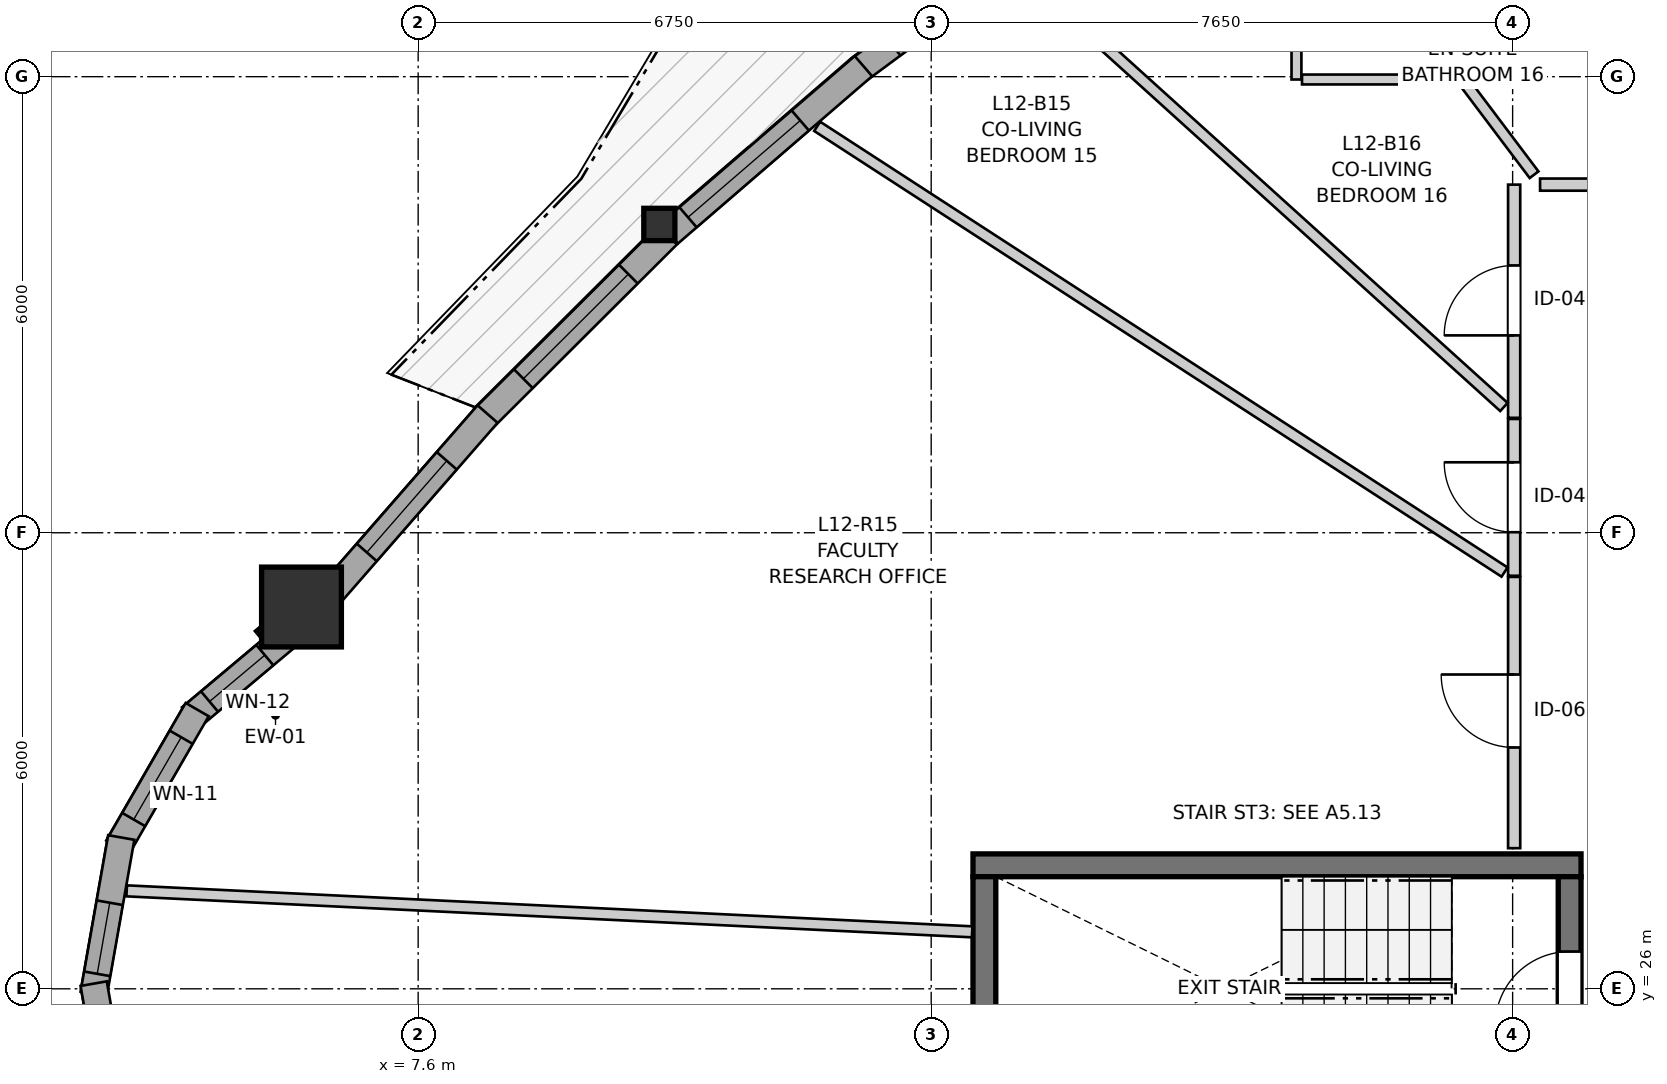
"""IFC4 building model, lengths in metres.
Left out: names, types, materials, properties, quantities, classifications, styles, units other than length and angle.
Written with IfcOpenShell. Run it as: python <this file> out.ifc"""

import sys

from ifc_helpers import new_model, si_unit, direction, frame, frame_2d, origin, origin_2d, place, context, subcontext, project, spatial, rectangle, i_section, extrude, source, transform, mapped, element, fill, save


model = new_model("IFC4")
c1 = context("Model", 3, precision=1e-05, world=origin(), true_north=direction((0.0, 1.0)))
c2 = subcontext(c1, "Body", "Model", "MODEL_VIEW")
j1 = project(units=[si_unit("LENGTHUNIT", "METRE"), si_unit("PLANEANGLEUNIT", "RADIAN")], contexts=[c1])
p1 = place(None, origin())
s1 = spatial("IfcSite", under=j1, at=p1, CompositionType="ELEMENT")
p2 = place(p1, origin())
s2 = spatial("IfcBuilding", under=s1, at=p2, CompositionType="ELEMENT")
p3 = place(p2, frame((0.0, 0.0, 43.0)))
s3 = spatial("IfcBuildingStorey", under=s2, at=p3, CompositionType="ELEMENT", Elevation=43.0)
p4 = place(p3, frame((22.9, 27.625, 0.0), z_axis=(0.0, 0.0, 1.0), x_axis=(-1.0, 0.0, 0.0)))
e1 = element("IfcWall", 1, at=p4, inside=s3, PredefinedType="SHEAR", context=c2, shape_type="SweptSolid", body=[
    extrude(rectangle(XDim=8.0, YDim=0.3, at=frame_2d((4.0, 0.0))), origin(), (0.0, 0.0, 1.0), 2.94),
])
p5 = place(p3, frame((15.05, 27.475, 0.0), z_axis=(0.0, 0.0, 1.0), x_axis=(0.0, -1.0, 0.0)))
e2 = element("IfcWall", 2, at=p5, inside=s3, PredefinedType="SHEAR", context=c2, shape_type="SweptSolid", body=[
    extrude(rectangle(XDim=2.95, YDim=0.3, at=frame_2d((1.475, 0.0))), origin(), (0.0, 0.0, 1.0), 2.94),
])
p6 = place(p3, frame((22.75, 24.525, 0.0), z_axis=(0.0, 0.0, 1.0), x_axis=(0.0, 1.0, 0.0)))
e3 = element("IfcWall", 3, at=p6, inside=s3, PredefinedType="SHEAR", context=c2, shape_type="SweptSolid", body=[
    extrude(rectangle(XDim=2.95, YDim=0.3, at=frame_2d((1.475, 0.0))), origin(), (0.0, 0.0, 1.0), 2.94),
])
p7 = place(p6, frame((0.985, 0.0, 0.0)))
e4 = element("IfcOpeningElement", 4, at=p7, cuts=e3, PredefinedType="OPENING", context=c2, shape_type="SweptSolid", body=[
    extrude(rectangle(XDim=0.98, YDim=2.15, at=frame_2d((0.49, 1.075))), frame((0.0, 0.16, 0.0), z_axis=(0.0, -1.0, 0.0), x_axis=(1.0, 0.0, 0.0)), (0.0, 0.0, 1.0), 0.32),
])
m1 = source(origin(), c2, "Body", "SweptSolid", [
    extrude(rectangle(XDim=1.05, YDim=1.05, at=origin_2d()), origin(), (0.0, 0.0, 1.0), 2.94),
])
p8 = place(p3, frame((6.065, 31.023, 0.0), z_axis=(0.0, 0.0, 1.0), x_axis=(1.0, 0.0, 0.0)))
e5 = element("IfcColumn", 5, at=p8, inside=s3, PredefinedType="COLUMN", context=c2, shape_type="MappedRepresentation", body=[
    mapped(m1, transform((0.0, 0.0, 0.0), x_axis=(1.0, 0.0, 0.0), y_axis=(0.0, 1.0, 0.0), z_axis=(0.0, 0.0, 1.0), scale=1.0)),
])
m2 = source(origin(), c2, "Body", "SweptSolid", [
    extrude(i_section(OverallWidth=0.409, OverallDepth=0.425, WebThickness=0.03, FlangeThickness=0.048, FilletRadius=0.015, at=origin_2d()), origin(), (0.0, 0.0, 1.0), 2.94),
])
p9 = place(p3, frame((10.773, 36.056, 0.0), z_axis=(0.0, 0.0, 1.0), x_axis=(1.0, 0.0, 0.0)))
e6 = element("IfcColumn", 6, at=p9, inside=s3, PredefinedType="PILASTER", context=c2, shape_type="MappedRepresentation", body=[
    mapped(m2, transform((0.0, 0.0, 0.0), x_axis=(1.0, 0.0, 0.0), y_axis=(0.0, 1.0, 0.0), z_axis=(0.0, 0.0, 1.0), scale=1.0)),
])
p10 = place(p3, frame((5.948, 30.696, 0.0), z_axis=(0.0, 0.0, 1.0), x_axis=(-0.766058770736, -0.642770534311, 0.0)))
e7 = element("IfcWall", 7, at=p10, inside=s3, PredefinedType="SOLIDWALL", context=c2, shape_type="SweptSolid", body=[
    extrude(rectangle(XDim=1.752, YDim=0.35, at=frame_2d((0.876, 0.0))), origin(), (0.0, 0.0, 1.0), 2.42),
])
p11 = place(p10, frame((0.476, 0.0, 0.82)))
e8 = element("IfcOpeningElement", 8, at=p11, cuts=e7, PredefinedType="OPENING", context=c2, shape_type="SweptSolid", body=[
    extrude(rectangle(XDim=0.95, YDim=1.35, at=frame_2d((0.475, 0.675))), frame((0.0, 0.185, 0.0), z_axis=(0.0, -1.0, 0.0), x_axis=(1.0, 0.0, 0.0)), (0.0, 0.0, 1.0), 0.37),
])
p12 = place(p3, frame((4.692, 29.674, 0.0), z_axis=(0.0, 0.0, 1.0), x_axis=(-0.49990781971, -0.866078617559, 0.0)))
e9 = element("IfcWall", 9, at=p12, inside=s3, PredefinedType="SOLIDWALL", context=c2, shape_type="SweptSolid", body=[
    extrude(rectangle(XDim=2.09, YDim=0.35, at=frame_2d((1.045, 0.0))), origin(), (0.0, 0.0, 1.0), 2.42),
])
p13 = place(p12, frame((0.42, 0.0, 0.82)))
e10 = element("IfcOpeningElement", 10, at=p13, cuts=e9, PredefinedType="OPENING", context=c2, shape_type="SweptSolid", body=[
    extrude(rectangle(XDim=1.25, YDim=1.35, at=frame_2d((0.625, 0.675))), frame((0.0, 0.185, 0.0), z_axis=(0.0, -1.0, 0.0), x_axis=(1.0, 0.0, 0.0)), (0.0, 0.0, 1.0), 0.37),
])
p14 = place(p3, frame((3.694, 27.991, 0.0), z_axis=(0.0, 0.0, 1.0), x_axis=(-0.173558792186, -0.984823509902, 0.0)))
e11 = element("IfcWall", 11, at=p14, inside=s3, PredefinedType="SOLIDWALL", context=c2, shape_type="SweptSolid", body=[
    extrude(rectangle(XDim=2.09, YDim=0.35, at=frame_2d((1.045, 0.0))), origin(), (0.0, 0.0, 1.0), 2.42),
])
p15 = place(p14, frame((0.871, 0.0, 0.82)))
e12 = element("IfcOpeningElement", 12, at=p15, cuts=e11, PredefinedType="OPENING", context=c2, shape_type="SweptSolid", body=[
    extrude(rectangle(XDim=0.95, YDim=1.35, at=frame_2d((0.475, 0.675))), frame((0.0, 0.185, 0.0), z_axis=(0.0, -1.0, 0.0), x_axis=(1.0, 0.0, 0.0)), (0.0, 0.0, 1.0), 0.37),
])
p16 = place(p3, frame((3.331, 26.068, 0.0), z_axis=(0.0, 0.0, 1.0), x_axis=(0.173558792186, -0.984823509902, 0.0)))
e13 = element("IfcWall", 13, at=p16, inside=s3, PredefinedType="SOLIDWALL", context=c2, shape_type="SweptSolid", body=[
    extrude(rectangle(XDim=2.09, YDim=0.35, at=frame_2d((1.045, 0.0))), origin(), (0.0, 0.0, 1.0), 2.42),
])
p17 = place(p16, frame((0.32, 0.0, 0.82)))
e14 = element("IfcOpeningElement", 14, at=p17, cuts=e13, PredefinedType="OPENING", context=c2, shape_type="SweptSolid", body=[
    extrude(rectangle(XDim=1.45, YDim=1.25, at=frame_2d((0.725, 0.625))), frame((0.0, 0.185, 0.0), z_axis=(0.0, -1.0, 0.0), x_axis=(1.0, 0.0, 0.0)), (0.0, 0.0, 1.0), 0.37),
])
p18 = place(p3, frame((15.846, 39.902, 0.0), z_axis=(0.0, 0.0, 1.0), x_axis=(-0.803789189233, -0.594914228501, 0.0)))
e15 = element("IfcWall", 15, at=p18, inside=s3, PredefinedType="SOLIDWALL", context=c2, shape_type="SweptSolid", body=[
    extrude(rectangle(XDim=3.056, YDim=0.35, at=frame_2d((1.528, 0.0))), origin(), (0.0, 0.0, 1.0), 2.42),
])
p19 = place(p18, frame((1.044, 0.0, 0.82)))
e16 = element("IfcOpeningElement", 16, at=p19, cuts=e15, PredefinedType="OPENING", context=c2, shape_type="SweptSolid", body=[
    extrude(rectangle(XDim=1.45, YDim=1.25, at=frame_2d((0.725, 0.625))), frame((0.0, 0.185, 0.0), z_axis=(0.0, -1.0, 0.0), x_axis=(1.0, 0.0, 0.0)), (0.0, 0.0, 1.0), 0.37),
])
p20 = place(p3, frame((13.458, 38.139, 0.0), z_axis=(0.0, 0.0, 1.0), x_axis=(-0.757450680395, -0.652892385289, 0.0)))
e17 = element("IfcWall", 17, at=p20, inside=s3, PredefinedType="SOLIDWALL", context=c2, shape_type="SweptSolid", body=[
    extrude(rectangle(XDim=3.374, YDim=0.35, at=frame_2d((1.687, 0.0))), origin(), (0.0, 0.0, 1.0), 2.42),
])
p21 = place(p20, frame((1.097, 0.0, 0.82)))
e18 = element("IfcOpeningElement", 18, at=p21, cuts=e17, PredefinedType="OPENING", context=c2, shape_type="SweptSolid", body=[
    extrude(rectangle(XDim=1.95, YDim=1.4, at=frame_2d((0.975, 0.7))), frame((0.0, 0.185, 0.0), z_axis=(0.0, -1.0, 0.0), x_axis=(1.0, 0.0, 0.0)), (0.0, 0.0, 1.0), 0.37),
])
p22 = place(p3, frame((10.883, 35.918, 0.0), z_axis=(0.0, 0.0, 1.0), x_axis=(-0.708386995502, -0.70582424484, 0.0)))
e19 = element("IfcWall", 19, at=p22, inside=s3, PredefinedType="SOLIDWALL", context=c2, shape_type="SweptSolid", body=[
    extrude(rectangle(XDim=3.429, YDim=0.35, at=frame_2d((1.715, 0.0))), origin(), (0.0, 0.0, 1.0), 2.42),
])
p23 = place(p22, frame((0.73, 0.0, 0.82)))
e20 = element("IfcOpeningElement", 20, at=p23, cuts=e19, PredefinedType="OPENING", context=c2, shape_type="SweptSolid", body=[
    extrude(rectangle(XDim=1.95, YDim=1.4, at=frame_2d((0.975, 0.7))), frame((0.0, 0.185, 0.0), z_axis=(0.0, -1.0, 0.0), x_axis=(1.0, 0.0, 0.0)), (0.0, 0.0, 1.0), 0.37),
])
p24 = place(p3, frame((8.513, 33.561, 0.0), z_axis=(0.0, 0.0, 1.0), x_axis=(-0.657640586907, -0.753331838205, 0.0)))
e21 = element("IfcWall", 21, at=p24, inside=s3, PredefinedType="SOLIDWALL", context=c2, shape_type="SweptSolid", body=[
    extrude(rectangle(XDim=3.222, YDim=0.35, at=frame_2d((1.611, 0.0))), origin(), (0.0, 0.0, 1.0), 2.42),
])
p25 = place(p24, frame((0.816, 0.0, 0.82)))
e22 = element("IfcOpeningElement", 22, at=p25, cuts=e21, PredefinedType="OPENING", context=c2, shape_type="SweptSolid", body=[
    extrude(rectangle(XDim=1.6, YDim=1.35, at=frame_2d((0.8, 0.675))), frame((0.0, 0.185, 0.0), z_axis=(0.0, -1.0, 0.0), x_axis=(1.0, 0.0, 0.0)), (0.0, 0.0, 1.0), 0.37),
])
p26 = place(p3, frame((22.02, 27.85, 0.0), z_axis=(0.0, 0.0, 1.0), x_axis=(0.0, 1.0, 0.0)))
e23 = element("IfcWall", 23, at=p26, inside=s3, PredefinedType="PARTITIONING", context=c2, shape_type="SweptSolid", body=[
    extrude(rectangle(XDim=3.569, YDim=0.16, at=frame_2d((1.784, 0.0))), origin(), (0.0, 0.0, 1.0), 2.94),
])
p27 = place(p26, frame((1.325, 0.0, 0.0)))
e24 = element("IfcOpeningElement", 24, at=p27, cuts=e23, PredefinedType="OPENING", context=c2, shape_type="SweptSolid", body=[
    extrude(rectangle(XDim=0.96, YDim=2.1, at=frame_2d((0.48, 1.05))), frame((0.0, 0.09, 0.0), z_axis=(0.0, -1.0, 0.0), x_axis=(1.0, 0.0, 0.0)), (0.0, 0.0, 1.0), 0.18),
])
p28 = place(p3, frame((22.361, 36.58, 0.0), z_axis=(0.0, 0.0, 1.0), x_axis=(1.0, 0.0, 0.0)))
e25 = element("IfcWall", 25, at=p28, inside=s3, PredefinedType="PARTITIONING", context=c2, shape_type="SweptSolid", body=[
    extrude(rectangle(XDim=3.498, YDim=0.16, at=frame_2d((1.749, 0.0))), origin(), (0.0, 0.0, 1.0), 2.548),
])
p29 = place(p28, frame((1.291, 0.0, 0.0)))
e26 = element("IfcOpeningElement", 26, at=p29, cuts=e25, PredefinedType="OPENING", context=c2, shape_type="SweptSolid", body=[
    extrude(rectangle(XDim=0.92, YDim=2.1, at=frame_2d((0.46, 1.05))), frame((0.0, 0.09, 0.0), z_axis=(0.0, -1.0, 0.0), x_axis=(1.0, 0.0, 0.0)), (0.0, 0.0, 1.0), 0.18),
])
p30 = place(p3, frame((22.02, 33.512, 0.0), z_axis=(0.0, 0.0, 1.0), x_axis=(0.0, 1.0, 0.0)))
e27 = element("IfcWall", 27, at=p30, inside=s3, PredefinedType="PARTITIONING", context=c2, shape_type="SweptSolid", body=[
    extrude(rectangle(XDim=3.068, YDim=0.16, at=frame_2d((1.534, 0.0))), origin(), (0.0, 0.0, 1.0), 2.94),
])
p31 = place(p30, frame((1.084, 0.0, 0.0)))
e28 = element("IfcOpeningElement", 28, at=p31, cuts=e27, PredefinedType="OPENING", context=c2, shape_type="SweptSolid", body=[
    extrude(rectangle(XDim=0.92, YDim=2.1, at=frame_2d((0.46, 1.05))), frame((0.0, 0.09, 0.0), z_axis=(0.0, -1.0, 0.0), x_axis=(1.0, 0.0, 0.0)), (0.0, 0.0, 1.0), 0.18),
])
p32 = place(p3, frame((22.02, 31.434, 0.0), z_axis=(0.0, 0.0, 1.0), x_axis=(0.0, 1.0, 0.0)))
e29 = element("IfcWall", 29, at=p32, inside=s3, PredefinedType="PARTITIONING", context=c2, shape_type="SweptSolid", body=[
    extrude(rectangle(XDim=2.063, YDim=0.16, at=frame_2d((1.031, 0.0))), origin(), (0.0, 0.0, 1.0), 2.94),
])
p33 = place(p32, frame((0.573, 0.0, 0.0)))
e30 = element("IfcOpeningElement", 30, at=p33, cuts=e29, PredefinedType="OPENING", context=c2, shape_type="SweptSolid", body=[
    extrude(rectangle(XDim=0.92, YDim=2.1, at=frame_2d((0.46, 1.05))), frame((0.0, 0.09, 0.0), z_axis=(0.0, -1.0, 0.0), x_axis=(1.0, 0.0, 0.0)), (0.0, 0.0, 1.0), 0.18),
])
p34 = place(p3, frame((19.156, 39.863, 0.0), z_axis=(0.0, 0.0, 1.0), x_axis=(0.0, -1.0, 0.0)))
e31 = element("IfcWall", 31, at=p34, inside=s3, PredefinedType="PARTITIONING", context=c2, shape_type="SweptSolid", body=[
    extrude(rectangle(XDim=1.9, YDim=0.13, at=frame_2d((0.95, 0.0))), origin(), (0.0, 0.0, 1.0), 2.94),
])
p35 = place(p34, frame((0.51, 0.0, 0.0)))
e32 = element("IfcOpeningElement", 32, at=p35, cuts=e31, PredefinedType="OPENING", context=c2, shape_type="SweptSolid", body=[
    extrude(rectangle(XDim=0.88, YDim=2.05, at=frame_2d((0.44, 1.025))), frame((0.0, 0.075, 0.0), z_axis=(0.0, -1.0, 0.0), x_axis=(1.0, 0.0, 0.0)), (0.0, 0.0, 1.0), 0.15),
])
p36 = place(p3, frame((3.765, 27.289, 0.0), z_axis=(0.0, 0.0, 1.0), x_axis=(0.998826748689, -0.048426502082, 0.0)))
e33 = element("IfcWall", 33, at=p36, inside=s3, PredefinedType="PARTITIONING", context=c2, shape_type="SweptSolid", body=[
    extrude(rectangle(XDim=11.137, YDim=0.145, at=frame_2d((5.568, 0.0))), origin(), (0.0, 0.0, 1.0), 2.94),
])
p37 = place(p3, frame((12.85, 37.347, 0.0), z_axis=(0.0, 0.0, 1.0), x_axis=(0.839070272759, -0.544023048567, 0.0)))
e34 = element("IfcWall", 34, at=p37, inside=s3, PredefinedType="PARTITIONING", context=c2, shape_type="SweptSolid", body=[
    extrude(rectangle(XDim=10.779, YDim=0.145, at=frame_2d((5.389, 0.0))), origin(), (0.0, 0.0, 1.0), 2.94),
])
p38 = place(p3, frame((15.516, 39.413, 0.0), z_axis=(0.0, 0.0, 1.0), x_axis=(0.741796419009, -0.670625135784, 0.0)))
e35 = element("IfcWall", 35, at=p38, inside=s3, PredefinedType="PARTITIONING", context=c2, shape_type="SweptSolid", body=[
    extrude(rectangle(XDim=8.586, YDim=0.145, at=frame_2d((4.293, 0.0))), origin(), (0.0, 0.0, 1.0), 2.94),
])
p39 = place(p3, frame((20.941, 38.49, 0.0), z_axis=(0.0, 0.0, 1.0), x_axis=(0.601733790382, -0.798696716853, 0.0)))
e36 = element("IfcWall", 36, at=p39, inside=s3, PredefinedType="PARTITIONING", context=c2, shape_type="SweptSolid", body=[
    extrude(rectangle(XDim=2.229, YDim=0.145, at=frame_2d((1.114, 0.0))), origin(), (0.0, 0.0, 1.0), 2.94),
])
p40 = place(p3, frame((19.229, 37.963, 0.0), z_axis=(0.0, 0.0, 1.0), x_axis=(1.0, 0.0, 0.0)))
e37 = element("IfcWall", 37, at=p40, inside=s3, PredefinedType="PARTITIONING", context=c2, shape_type="SweptSolid", body=[
    extrude(rectangle(XDim=1.727, YDim=0.13, at=frame_2d((0.864, 0.0))), origin(), (0.0, 0.0, 1.0), 2.508),
])
p41 = place(p3, frame((20.956, 37.963, 0.0), z_axis=(0.0, 0.0, 1.0), x_axis=(0.0, 1.0, 0.0)))
e38 = element("IfcWall", 38, at=p41, inside=s3, PredefinedType="PARTITIONING", context=c2, shape_type="SweptSolid", body=[
    extrude(rectangle(XDim=0.417, YDim=0.13, at=frame_2d((0.208, 0.0))), origin(), (0.0, 0.0, 1.0), 2.94),
])
m3 = source(origin(), c2, "Body", "SweptSolid", [
    extrude(rectangle(XDim=0.95, YDim=1.35, at=frame_2d((0.475, 0.675))), frame((0.0, 0.03, 0.0), z_axis=(0.0, -1.0, 0.0), x_axis=(1.0, 0.0, 0.0)), (0.0, 0.0, 1.0), 0.06),
])
p42 = place(p11, origin())
e39 = element("IfcWindow", 39, at=p42, inside=s3, PartitioningType="SINGLE_PANEL", PredefinedType="WINDOW", context=c2, shape_type="MappedRepresentation", body=[
    mapped(m3, transform((0.0, 0.0, 0.0), x_axis=(1.0, 0.0, 0.0), y_axis=(0.0, 1.0, 0.0), z_axis=(0.0, 0.0, 1.0), scale=1.0)),
])
fill(e8, e39)
m4 = source(origin(), c2, "Body", "SweptSolid", [
    extrude(rectangle(XDim=1.25, YDim=1.35, at=frame_2d((0.625, 0.675))), frame((0.0, 0.03, 0.0), z_axis=(0.0, -1.0, 0.0), x_axis=(1.0, 0.0, 0.0)), (0.0, 0.0, 1.0), 0.06),
])
p43 = place(p13, origin())
e40 = element("IfcWindow", 40, at=p43, inside=s3, PartitioningType="SINGLE_PANEL", PredefinedType="WINDOW", context=c2, shape_type="MappedRepresentation", body=[
    mapped(m4, transform((0.0, 0.0, 0.0), x_axis=(1.0, 0.0, 0.0), y_axis=(0.0, 1.0, 0.0), z_axis=(0.0, 0.0, 1.0), scale=1.0)),
])
fill(e10, e40)
p44 = place(p15, origin())
e41 = element("IfcWindow", 41, at=p44, inside=s3, PartitioningType="SINGLE_PANEL", PredefinedType="WINDOW", context=c2, shape_type="MappedRepresentation", body=[
    mapped(m3, transform((0.0, 0.0, 0.0), x_axis=(1.0, 0.0, 0.0), y_axis=(0.0, 1.0, 0.0), z_axis=(0.0, 0.0, 1.0), scale=1.0)),
])
fill(e12, e41)
m5 = source(origin(), c2, "Body", "SweptSolid", [
    extrude(rectangle(XDim=1.95, YDim=1.4, at=frame_2d((0.975, 0.7))), frame((0.0, 0.03, 0.0), z_axis=(0.0, -1.0, 0.0), x_axis=(1.0, 0.0, 0.0)), (0.0, 0.0, 1.0), 0.06),
])
p45 = place(p21, origin())
e42 = element("IfcWindow", 42, at=p45, inside=s3, PartitioningType="SINGLE_PANEL", PredefinedType="WINDOW", context=c2, shape_type="MappedRepresentation", body=[
    mapped(m5, transform((0.0, 0.0, 0.0), x_axis=(1.0, 0.0, 0.0), y_axis=(0.0, 1.0, 0.0), z_axis=(0.0, 0.0, 1.0), scale=1.0)),
])
fill(e18, e42)
p46 = place(p23, origin())
e43 = element("IfcWindow", 43, at=p46, inside=s3, PartitioningType="SINGLE_PANEL", PredefinedType="WINDOW", context=c2, shape_type="MappedRepresentation", body=[
    mapped(m5, transform((0.0, 0.0, 0.0), x_axis=(1.0, 0.0, 0.0), y_axis=(0.0, 1.0, 0.0), z_axis=(0.0, 0.0, 1.0), scale=1.0)),
])
fill(e20, e43)
m6 = source(origin(), c2, "Body", "SweptSolid", [
    extrude(rectangle(XDim=1.6, YDim=1.35, at=frame_2d((0.8, 0.675))), frame((0.0, 0.03, 0.0), z_axis=(0.0, -1.0, 0.0), x_axis=(1.0, 0.0, 0.0)), (0.0, 0.0, 1.0), 0.06),
])
p47 = place(p25, origin())
e44 = element("IfcWindow", 44, at=p47, inside=s3, PartitioningType="SINGLE_PANEL", PredefinedType="WINDOW", context=c2, shape_type="MappedRepresentation", body=[
    mapped(m6, transform((0.0, 0.0, 0.0), x_axis=(1.0, 0.0, 0.0), y_axis=(0.0, 1.0, 0.0), z_axis=(0.0, 0.0, 1.0), scale=1.0)),
])
fill(e22, e44)
m7 = source(origin(), c2, "Body", "SweptSolid", [
    extrude(rectangle(XDim=0.98, YDim=2.15, at=frame_2d((0.49, 1.075))), frame((0.0, 0.025, 0.0), z_axis=(0.0, -1.0, 0.0), x_axis=(1.0, 0.0, 0.0)), (0.0, 0.0, 1.0), 0.05),
])
p48 = place(p7, origin())
e45 = element("IfcDoor", 45, at=p48, inside=s3, OperationType="SINGLE_SWING_LEFT", PredefinedType="DOOR", context=c2, shape_type="MappedRepresentation", body=[
    mapped(m7, transform((0.0, 0.0, 0.0), x_axis=(1.0, 0.0, 0.0), y_axis=(0.0, 1.0, 0.0), z_axis=(0.0, 0.0, 1.0), scale=1.0)),
])
fill(e4, e45)
m8 = source(origin(), c2, "Body", "SweptSolid", [
    extrude(rectangle(XDim=0.96, YDim=2.1, at=frame_2d((0.48, 1.05))), frame((0.0, 0.025, 0.0), z_axis=(0.0, -1.0, 0.0), x_axis=(1.0, 0.0, 0.0)), (0.0, 0.0, 1.0), 0.05),
])
p49 = place(p27, origin())
e46 = element("IfcDoor", 46, at=p49, inside=s3, OperationType="SINGLE_SWING_RIGHT", PredefinedType="DOOR", context=c2, shape_type="MappedRepresentation", body=[
    mapped(m8, transform((0.0, 0.0, 0.0), x_axis=(1.0, 0.0, 0.0), y_axis=(0.0, 1.0, 0.0), z_axis=(0.0, 0.0, 1.0), scale=1.0)),
])
fill(e24, e46)
m9 = source(origin(), c2, "Body", "SweptSolid", [
    extrude(rectangle(XDim=0.92, YDim=2.1, at=frame_2d((0.46, 1.05))), frame((0.0, 0.025, 0.0), z_axis=(0.0, -1.0, 0.0), x_axis=(1.0, 0.0, 0.0)), (0.0, 0.0, 1.0), 0.05),
])
p50 = place(p31, origin())
e47 = element("IfcDoor", 47, at=p50, inside=s3, OperationType="SINGLE_SWING_LEFT", PredefinedType="DOOR", context=c2, shape_type="MappedRepresentation", body=[
    mapped(m9, transform((0.0, 0.0, 0.0), x_axis=(1.0, 0.0, 0.0), y_axis=(0.0, 1.0, 0.0), z_axis=(0.0, 0.0, 1.0), scale=1.0)),
])
fill(e28, e47)
p51 = place(p33, origin())
e48 = element("IfcDoor", 48, at=p51, inside=s3, OperationType="SINGLE_SWING_RIGHT", PredefinedType="DOOR", context=c2, shape_type="MappedRepresentation", body=[
    mapped(m9, transform((0.0, 0.0, 0.0), x_axis=(1.0, 0.0, 0.0), y_axis=(0.0, 1.0, 0.0), z_axis=(0.0, 0.0, 1.0), scale=1.0)),
])
fill(e30, e48)
save(model, sys.argv[1])
